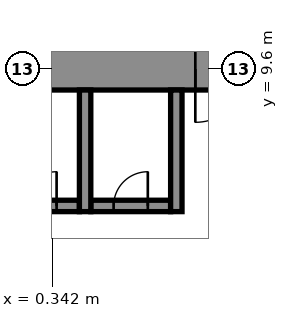
"""IFC4 building model, lengths in metres.
Left out: names, types, materials, properties, quantities, classifications, styles, units other than length and angle.
Written with IfcOpenShell. Run it as: python <this file> out.ifc"""

import sys

from ifc_helpers import new_model, si_unit, direction, frame, frame_2d, origin, place, context, subcontext, project, spatial, rectangle, extrude, element, fill, save


model = new_model("IFC4")
c1 = context("Model", 3, precision=1e-05, world=origin(), true_north=direction((0.0, 1.0)))
c2 = subcontext(c1, "Body", "Model", "MODEL_VIEW")
j1 = project(units=[si_unit("LENGTHUNIT", "METRE"), si_unit("PLANEANGLEUNIT", "RADIAN")], contexts=[c1])
p1 = place(None, origin())
s1 = spatial("IfcSite", under=j1, at=p1, CompositionType="ELEMENT")
p2 = place(p1, origin())
s2 = spatial("IfcBuilding", under=s1, at=p2, CompositionType="ELEMENT")
p3 = place(p2, frame((0.0, 0.0, 17.4)))
s3 = spatial("IfcBuildingStorey", under=s2, at=p3, CompositionType="ELEMENT", Elevation=17.4)
p4 = place(p3, frame((-1.05, 6.0, -0.25), z_axis=(0.0, 0.0, 1.0), x_axis=(1.0, 0.0, 0.0)))
e1 = element("IfcWall", 1, at=p4, inside=s3, PredefinedType="STANDARD", context=c2, shape_type="SweptSolid", body=[
    extrude(rectangle(XDim=2.1, YDim=0.3, at=frame_2d((1.05, 0.0))), origin(), (0.0, 0.0, 1.0), 5.0),
])
p5 = place(p4, frame((0.6, 0.0, 0.25)))
e2 = element("IfcOpeningElement", 2, at=p5, cuts=e1, PredefinedType="OPENING", context=c2, shape_type="SweptSolid", body=[
    extrude(rectangle(XDim=0.9, YDim=2.1, at=frame_2d((0.45, 1.05))), frame((0.0, 0.16, 0.0), z_axis=(0.0, -1.0, 0.0), x_axis=(1.0, 0.0, 0.0)), (0.0, 0.0, 1.0), 0.32),
])
p6 = place(p3, frame((1.35, 6.0, -0.25), z_axis=(0.0, 0.0, 1.0), x_axis=(1.0, 0.0, 0.0)))
e3 = element("IfcWall", 3, at=p6, inside=s3, PredefinedType="STANDARD", context=c2, shape_type="SweptSolid", body=[
    extrude(rectangle(XDim=2.1, YDim=0.3, at=frame_2d((1.05, 0.0))), origin(), (0.0, 0.0, 1.0), 5.0),
])
p7 = place(p6, frame((0.6, 0.0, 0.25)))
e4 = element("IfcOpeningElement", 4, at=p7, cuts=e3, PredefinedType="OPENING", context=c2, shape_type="SweptSolid", body=[
    extrude(rectangle(XDim=0.9, YDim=2.1, at=frame_2d((0.45, 1.05))), frame((0.0, 0.16, 0.0), z_axis=(0.0, -1.0, 0.0), x_axis=(1.0, 0.0, 0.0)), (0.0, 0.0, 1.0), 0.32),
])
p8 = place(p3, frame((-5.25, 9.6, -0.25), z_axis=(0.0, 0.0, 1.0), x_axis=(1.0, 0.0, 0.0)))
e5 = element("IfcWall", 5, at=p8, inside=s3, PredefinedType="SHEAR", context=c2, shape_type="SweptSolid", body=[
    extrude(rectangle(XDim=14.3, YDim=1.1, at=frame_2d((7.15, 0.0))), origin(), (0.0, 0.0, 1.0), 5.0),
])
p9 = place(p8, frame((9.35, 0.0, 0.25)))
e6 = element("IfcOpeningElement", 6, at=p9, cuts=e5, PredefinedType="OPENING", context=c2, shape_type="SweptSolid", body=[
    extrude(rectangle(XDim=1.4, YDim=2.1, at=frame_2d((0.7, 1.05))), frame((0.0, 0.56, 0.0), z_axis=(0.0, -1.0, 0.0), x_axis=(1.0, 0.0, 0.0)), (0.0, 0.0, 1.0), 1.12),
])
for number, where, z_axis, x_axis in (
    (7, (1.2, 5.85, -0.25), (0.0, 0.0, 1.0), (0.0, 1.0, 0.0)),
    (8, (3.6, 5.85, -0.25), (0.0, 0.0, 1.0), (0.0, 1.0, 0.0)),
):
    element("IfcWall", number, at=place(p3, frame(where, z_axis=z_axis, x_axis=x_axis)), inside=s3, PredefinedType="STANDARD", context=c2, shape_type="SweptSolid", body=[
        extrude(rectangle(XDim=3.2, YDim=0.3, at=frame_2d((1.6, 0.0))), origin(), (0.0, 0.0, 1.0), 5.0),
    ])
p10 = place(p5, origin())
e9 = element("IfcDoor", 9, at=p10, inside=s3, OperationType="SINGLE_SWING_RIGHT", PredefinedType="DOOR", context=c2, shape_type="SweptSolid", body=[
    extrude(rectangle(XDim=0.9, YDim=2.1, at=frame_2d((0.45, 1.05))), frame((0.0, 0.025, 0.0), z_axis=(0.0, -1.0, 0.0), x_axis=(1.0, 0.0, 0.0)), (0.0, 0.0, 1.0), 0.05),
])
fill(e2, e9)
p11 = place(p7, origin())
e10 = element("IfcDoor", 10, at=p11, inside=s3, OperationType="SINGLE_SWING_RIGHT", PredefinedType="DOOR", context=c2, shape_type="SweptSolid", body=[
    extrude(rectangle(XDim=0.9, YDim=2.1, at=frame_2d((0.45, 1.05))), frame((0.0, 0.025, 0.0), z_axis=(0.0, -1.0, 0.0), x_axis=(1.0, 0.0, 0.0)), (0.0, 0.0, 1.0), 0.05),
])
fill(e4, e10)
p12 = place(p9, frame((1.4, 0.0, 0.0), z_axis=(0.0, 0.0, 1.0), x_axis=(-1.0, 0.0, 0.0)))
e11 = element("IfcDoor", 11, at=p12, inside=s3, OperationType="SINGLE_SWING_LEFT", PredefinedType="DOOR", context=c2, shape_type="SweptSolid", body=[
    extrude(rectangle(XDim=1.4, YDim=2.1, at=frame_2d((0.7, 1.05))), frame((0.0, 0.025, 0.0), z_axis=(0.0, -1.0, 0.0), x_axis=(1.0, 0.0, 0.0)), (0.0, 0.0, 1.0), 0.05),
])
fill(e6, e11)
save(model, sys.argv[1])
